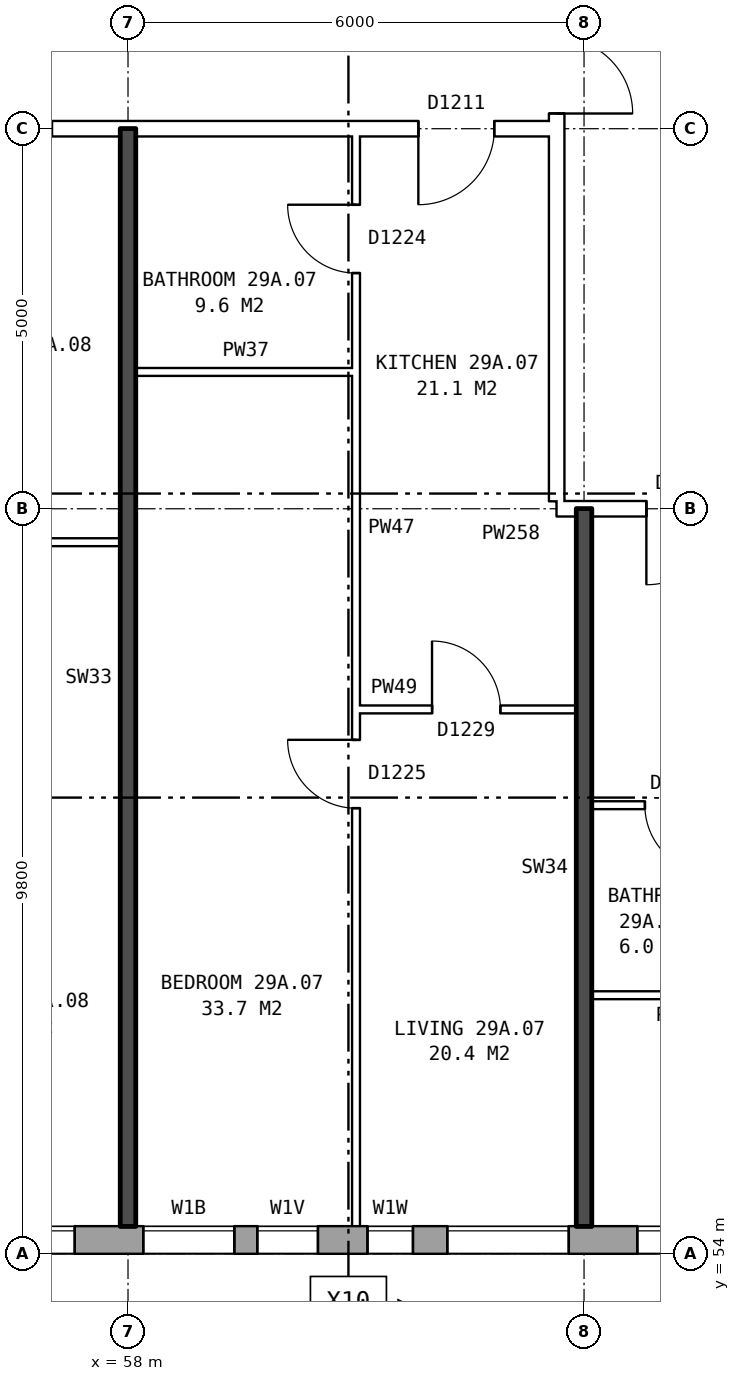
"""IFC4 building model, lengths in metres.
Left out: names, types, materials, properties, quantities, classifications, styles, units other than length and angle.
Written with IfcOpenShell. Run it as: python <this file> out.ifc"""

import sys

from ifc_helpers import new_model, si_unit, direction, frame, frame_2d, origin, place, context, subcontext, project, spatial, rectangle, extrude, element, fill, save


model = new_model("IFC4")
c1 = context("Model", 3, precision=1e-05, world=origin(), true_north=direction((0.0, 1.0)))
c2 = subcontext(c1, "Body", "Model", "MODEL_VIEW")
j1 = project(units=[si_unit("LENGTHUNIT", "METRE"), si_unit("PLANEANGLEUNIT", "RADIAN")], contexts=[c1])
p1 = place(None, origin())
s1 = spatial("IfcSite", under=j1, at=p1, CompositionType="ELEMENT")
p2 = place(p1, origin())
s2 = spatial("IfcBuilding", under=s1, at=p2, CompositionType="ELEMENT")
p3 = place(p2, frame((0.0, 0.0, 105.7)))
s3 = spatial("IfcBuildingStorey", under=s2, at=p3, CompositionType="ELEMENT", Elevation=105.7)
p4 = place(p3, frame((28.075, 54.18, 0.0), z_axis=(0.0, 0.0, 1.0), x_axis=(1.0, 0.0, 0.0)))
e1 = element("IfcWall", 1, at=p4, inside=s3, PredefinedType="STANDARD", context=c2, shape_type="SweptSolid", body=[
    extrude(rectangle(XDim=44.851, YDim=0.36, at=frame_2d((22.425, 0.0))), origin(), (0.0, 0.0, 1.0), 2.85),
])
p5 = place(p4, frame((0.625, 0.0, 0.8)))
e2 = element("IfcOpeningElement", 2, at=p5, cuts=e1, PredefinedType="OPENING", context=c2, shape_type="SweptSolid", body=[
    extrude(rectangle(XDim=1.6, YDim=1.8, at=frame_2d((0.8, 0.9))), frame((0.0, 0.19, 0.0), z_axis=(0.0, -1.0, 0.0), x_axis=(1.0, 0.0, 0.0)), (0.0, 0.0, 1.0), 0.38),
])
p6 = place(p4, frame((3.625, 0.0, 0.8)))
e3 = element("IfcOpeningElement", 3, at=p6, cuts=e1, PredefinedType="OPENING", context=c2, shape_type="SweptSolid", body=[
    extrude(rectangle(XDim=1.6, YDim=1.8, at=frame_2d((0.8, 0.9))), frame((0.0, 0.19, 0.0), z_axis=(0.0, -1.0, 0.0), x_axis=(1.0, 0.0, 0.0)), (0.0, 0.0, 1.0), 0.38),
])
p7 = place(p4, frame((6.625, 0.0, 0.8)))
e4 = element("IfcOpeningElement", 4, at=p7, cuts=e1, PredefinedType="OPENING", context=c2, shape_type="SweptSolid", body=[
    extrude(rectangle(XDim=1.6, YDim=1.8, at=frame_2d((0.8, 0.9))), frame((0.0, 0.19, 0.0), z_axis=(0.0, -1.0, 0.0), x_axis=(1.0, 0.0, 0.0)), (0.0, 0.0, 1.0), 0.38),
])
p8 = place(p4, frame((8.525, 0.0, 0.8)))
e5 = element("IfcOpeningElement", 5, at=p8, cuts=e1, PredefinedType="OPENING", context=c2, shape_type="SweptSolid", body=[
    extrude(rectangle(XDim=1.4, YDim=1.8, at=frame_2d((0.7, 0.9))), frame((0.0, 0.19, 0.0), z_axis=(0.0, -1.0, 0.0), x_axis=(1.0, 0.0, 0.0)), (0.0, 0.0, 1.0), 0.38),
])
p9 = place(p4, frame((13.175, 0.0, 0.8)))
e6 = element("IfcOpeningElement", 6, at=p9, cuts=e1, PredefinedType="OPENING", context=c2, shape_type="SweptSolid", body=[
    extrude(rectangle(XDim=1.0, YDim=0.9, at=frame_2d((0.5, 0.45))), frame((0.0, 0.19, 0.0), z_axis=(0.0, -1.0, 0.0), x_axis=(1.0, 0.0, 0.0)), (0.0, 0.0, 1.0), 0.38),
])
p10 = place(p4, frame((15.625, 0.0, 0.8)))
e7 = element("IfcOpeningElement", 7, at=p10, cuts=e1, PredefinedType="OPENING", context=c2, shape_type="SweptSolid", body=[
    extrude(rectangle(XDim=1.6, YDim=1.8, at=frame_2d((0.8, 0.9))), frame((0.0, 0.19, 0.0), z_axis=(0.0, -1.0, 0.0), x_axis=(1.0, 0.0, 0.0)), (0.0, 0.0, 1.0), 0.38),
])
p11 = place(p4, frame((18.625, 0.0, 0.8)))
e8 = element("IfcOpeningElement", 8, at=p11, cuts=e1, PredefinedType="OPENING", context=c2, shape_type="SweptSolid", body=[
    extrude(rectangle(XDim=1.6, YDim=1.8, at=frame_2d((0.8, 0.9))), frame((0.0, 0.19, 0.0), z_axis=(0.0, -1.0, 0.0), x_axis=(1.0, 0.0, 0.0)), (0.0, 0.0, 1.0), 0.38),
])
p12 = place(p4, frame((21.625, 0.0, 0.8)))
e9 = element("IfcOpeningElement", 9, at=p12, cuts=e1, PredefinedType="OPENING", context=c2, shape_type="SweptSolid", body=[
    extrude(rectangle(XDim=1.6, YDim=1.8, at=frame_2d((0.8, 0.9))), frame((0.0, 0.19, 0.0), z_axis=(0.0, -1.0, 0.0), x_axis=(1.0, 0.0, 0.0)), (0.0, 0.0, 1.0), 0.38),
])
p13 = place(p4, frame((24.625, 0.0, 0.8)))
e10 = element("IfcOpeningElement", 10, at=p13, cuts=e1, PredefinedType="OPENING", context=c2, shape_type="SweptSolid", body=[
    extrude(rectangle(XDim=1.6, YDim=1.8, at=frame_2d((0.8, 0.9))), frame((0.0, 0.19, 0.0), z_axis=(0.0, -1.0, 0.0), x_axis=(1.0, 0.0, 0.0)), (0.0, 0.0, 1.0), 0.38),
])
p14 = place(p4, frame((27.625, 0.0, 0.8)))
e11 = element("IfcOpeningElement", 11, at=p14, cuts=e1, PredefinedType="OPENING", context=c2, shape_type="SweptSolid", body=[
    extrude(rectangle(XDim=1.6, YDim=1.8, at=frame_2d((0.8, 0.9))), frame((0.0, 0.19, 0.0), z_axis=(0.0, -1.0, 0.0), x_axis=(1.0, 0.0, 0.0)), (0.0, 0.0, 1.0), 0.38),
])
p15 = place(p4, frame((30.125, 0.0, 0.15)))
e12 = element("IfcOpeningElement", 12, at=p15, cuts=e1, PredefinedType="OPENING", context=c2, shape_type="SweptSolid", body=[
    extrude(rectangle(XDim=1.2, YDim=1.8, at=frame_2d((0.6, 0.9))), frame((0.0, 0.19, 0.0), z_axis=(0.0, -1.0, 0.0), x_axis=(1.0, 0.0, 0.0)), (0.0, 0.0, 1.0), 0.38),
])
p16 = place(p4, frame((33.075, 0.0, 1.6)))
e13 = element("IfcOpeningElement", 13, at=p16, cuts=e1, PredefinedType="OPENING", context=c2, shape_type="SweptSolid", body=[
    extrude(rectangle(XDim=0.6, YDim=0.9, at=frame_2d((0.3, 0.45))), frame((0.0, 0.19, 0.0), z_axis=(0.0, -1.0, 0.0), x_axis=(1.0, 0.0, 0.0)), (0.0, 0.0, 1.0), 0.38),
])
p17 = place(p4, frame((36.625, 0.0, 0.8)))
e14 = element("IfcOpeningElement", 14, at=p17, cuts=e1, PredefinedType="OPENING", context=c2, shape_type="SweptSolid", body=[
    extrude(rectangle(XDim=1.6, YDim=1.8, at=frame_2d((0.8, 0.9))), frame((0.0, 0.19, 0.0), z_axis=(0.0, -1.0, 0.0), x_axis=(1.0, 0.0, 0.0)), (0.0, 0.0, 1.0), 0.38),
])
p18 = place(p4, frame((39.625, 0.0, 0.8)))
e15 = element("IfcOpeningElement", 15, at=p18, cuts=e1, PredefinedType="OPENING", context=c2, shape_type="SweptSolid", body=[
    extrude(rectangle(XDim=1.6, YDim=1.8, at=frame_2d((0.8, 0.9))), frame((0.0, 0.19, 0.0), z_axis=(0.0, -1.0, 0.0), x_axis=(1.0, 0.0, 0.0)), (0.0, 0.0, 1.0), 0.38),
])
p19 = place(p4, frame((42.625, 0.0, 0.8)))
e16 = element("IfcOpeningElement", 16, at=p19, cuts=e1, PredefinedType="OPENING", context=c2, shape_type="SweptSolid", body=[
    extrude(rectangle(XDim=1.6, YDim=1.8, at=frame_2d((0.8, 0.9))), frame((0.0, 0.19, 0.0), z_axis=(0.0, -1.0, 0.0), x_axis=(1.0, 0.0, 0.0)), (0.0, 0.0, 1.0), 0.38),
])
p20 = place(p4, frame((10.225, 0.0, 1.1)))
e17 = element("IfcOpeningElement", 17, at=p20, cuts=e1, PredefinedType="OPENING", context=c2, shape_type="SweptSolid", body=[
    extrude(rectangle(XDim=0.8, YDim=1.5, at=frame_2d((0.4, 0.75))), frame((0.0, 0.19, 0.0), z_axis=(0.0, -1.0, 0.0), x_axis=(1.0, 0.0, 0.0)), (0.0, 0.0, 1.0), 0.38),
])
p21 = place(p4, frame((14.475, 0.0, 0.8)))
e18 = element("IfcOpeningElement", 18, at=p21, cuts=e1, PredefinedType="OPENING", context=c2, shape_type="SweptSolid", body=[
    extrude(rectangle(XDim=0.8, YDim=1.8, at=frame_2d((0.4, 0.9))), frame((0.0, 0.19, 0.0), z_axis=(0.0, -1.0, 0.0), x_axis=(1.0, 0.0, 0.0)), (0.0, 0.0, 1.0), 0.38),
])
p22 = place(p4, frame((31.625, 0.0, 0.25)))
e19 = element("IfcOpeningElement", 19, at=p22, cuts=e1, PredefinedType="OPENING", context=c2, shape_type="SweptSolid", body=[
    extrude(rectangle(XDim=0.8, YDim=0.9, at=frame_2d((0.4, 0.45))), frame((0.0, 0.19, 0.0), z_axis=(0.0, -1.0, 0.0), x_axis=(1.0, 0.0, 0.0)), (0.0, 0.0, 1.0), 0.38),
])
p23 = place(p4, frame((34.125, 0.0, 0.8)))
e20 = element("IfcOpeningElement", 20, at=p23, cuts=e1, PredefinedType="OPENING", context=c2, shape_type="SweptSolid", body=[
    extrude(rectangle(XDim=1.6, YDim=1.8, at=frame_2d((0.8, 0.9))), frame((0.0, 0.19, 0.0), z_axis=(0.0, -1.0, 0.0), x_axis=(1.0, 0.0, 0.0)), (0.0, 0.0, 1.0), 0.38),
])
p24 = place(p3, frame((63.64, 63.9, 0.0), z_axis=(0.0, 0.0, 1.0), x_axis=(0.0, 1.0, 0.0)))
e21 = element("IfcWall", 21, at=p24, inside=s3, PredefinedType="PARTITIONING", context=c2, shape_type="SweptSolid", body=[
    extrude(rectangle(XDim=12.2, YDim=0.2, at=frame_2d((6.1, 0.0))), origin(), (0.0, 0.0, 1.0), 2.85),
])
p25 = place(p24, frame((5.1, 0.0, 0.0)))
e22 = element("IfcOpeningElement", 22, at=p25, cuts=e21, PredefinedType="OPENING", context=c2, shape_type="SweptSolid", body=[
    extrude(rectangle(XDim=2.0, YDim=2.1, at=frame_2d((1.0, 1.05))), frame((0.0, 0.11, 0.0), z_axis=(0.0, -1.0, 0.0), x_axis=(1.0, 0.0, 0.0)), (0.0, 0.0, 1.0), 0.22),
])
p26 = place(p3, frame((64.1, 57.4, 0.0), z_axis=(0.0, 0.0, 1.0), x_axis=(1.0, 0.0, 0.0)))
e23 = element("IfcWall", 23, at=p26, inside=s3, PredefinedType="PARTITIONING", context=c2, shape_type="SweptSolid", body=[
    extrude(rectangle(XDim=2.3, YDim=0.1, at=frame_2d((1.15, 0.0))), origin(), (0.0, 0.0, 1.0), 2.85),
])
p27 = place(p3, frame((64.1, 59.9, 0.0), z_axis=(0.0, 0.0, 1.0), x_axis=(1.0, 0.0, 0.0)))
e24 = element("IfcWall", 24, at=p27, inside=s3, PredefinedType="PARTITIONING", context=c2, shape_type="SweptSolid", body=[
    extrude(rectangle(XDim=5.8, YDim=0.1, at=frame_2d((2.9, 0.0))), origin(), (0.0, 0.0, 1.0), 2.85),
])
p28 = place(p27, frame((3.6, 0.0, 0.0)))
e25 = element("IfcOpeningElement", 25, at=p28, cuts=e24, PredefinedType="OPENING", context=c2, shape_type="SweptSolid", body=[
    extrude(rectangle(XDim=0.9, YDim=2.1, at=frame_2d((0.45, 1.05))), frame((0.0, 0.06, 0.0), z_axis=(0.0, -1.0, 0.0), x_axis=(1.0, 0.0, 0.0)), (0.0, 0.0, 1.0), 0.12),
])
p29 = place(p27, frame((0.7, 0.0, 0.0)))
e26 = element("IfcOpeningElement", 26, at=p29, cuts=e24, PredefinedType="OPENING", context=c2, shape_type="SweptSolid", body=[
    extrude(rectangle(XDim=0.9, YDim=2.1, at=frame_2d((0.45, 1.05))), frame((0.0, 0.06, 0.0), z_axis=(0.0, -1.0, 0.0), x_axis=(1.0, 0.0, 0.0)), (0.0, 0.0, 1.0), 0.12),
])
p30 = place(p3, frame((61.0, 61.16, 0.0), z_axis=(0.0, 0.0, 1.0), x_axis=(1.0, 0.0, 0.0)))
e27 = element("IfcWall", 27, at=p30, inside=s3, PredefinedType="PARTITIONING", context=c2, shape_type="SweptSolid", body=[
    extrude(rectangle(XDim=2.9, YDim=0.1, at=frame_2d((1.45, 0.0))), origin(), (0.0, 0.0, 1.0), 2.85),
])
p31 = place(p30, frame((1.0, 0.0, 0.0)))
e28 = element("IfcOpeningElement", 28, at=p31, cuts=e27, PredefinedType="OPENING", context=c2, shape_type="SweptSolid", body=[
    extrude(rectangle(XDim=0.9, YDim=2.1, at=frame_2d((0.45, 1.05))), frame((0.0, 0.06, 0.0), z_axis=(0.0, -1.0, 0.0), x_axis=(1.0, 0.0, 0.0)), (0.0, 0.0, 1.0), 0.12),
])
p32 = place(p3, frame((55.0, 63.36, 0.0), z_axis=(0.0, 0.0, 1.0), x_axis=(1.0, 0.0, 0.0)))
e29 = element("IfcWall", 29, at=p32, inside=s3, PredefinedType="PARTITIONING", context=c2, shape_type="SweptSolid", body=[
    extrude(rectangle(XDim=2.9, YDim=0.1, at=frame_2d((1.45, 0.0))), origin(), (0.0, 0.0, 1.0), 2.85),
])
p33 = place(p32, frame((1.0, 0.0, 0.0)))
e30 = element("IfcOpeningElement", 30, at=p33, cuts=e29, PredefinedType="OPENING", context=c2, shape_type="SweptSolid", body=[
    extrude(rectangle(XDim=0.9, YDim=2.1, at=frame_2d((0.45, 1.05))), frame((0.0, 0.06, 0.0), z_axis=(0.0, -1.0, 0.0), x_axis=(1.0, 0.0, 0.0)), (0.0, 0.0, 1.0), 0.12),
])
p34 = place(p3, frame((63.64, 63.8, 0.0), z_axis=(0.0, 0.0, 1.0), x_axis=(1.0, 0.0, 0.0)))
e31 = element("IfcWall", 31, at=p34, inside=s3, PredefinedType="PARTITIONING", context=c2, shape_type="SweptSolid", body=[
    extrude(rectangle(XDim=3.0, YDim=0.2, at=frame_2d((1.5, 0.0))), origin(), (0.0, 0.0, 1.0), 2.85),
])
p35 = place(p34, frame((1.18, 0.0, 0.0)))
e32 = element("IfcOpeningElement", 32, at=p35, cuts=e31, PredefinedType="OPENING", context=c2, shape_type="SweptSolid", body=[
    extrude(rectangle(XDim=1.0, YDim=2.1, at=frame_2d((0.5, 1.05))), frame((0.0, 0.11, 0.0), z_axis=(0.0, -1.0, 0.0), x_axis=(1.0, 0.0, 0.0)), (0.0, 0.0, 1.0), 0.22),
])
p36 = place(p3, frame((58.1, 65.6, 0.0), z_axis=(0.0, 0.0, 1.0), x_axis=(1.0, 0.0, 0.0)))
e33 = element("IfcWall", 33, at=p36, inside=s3, PredefinedType="PARTITIONING", context=c2, shape_type="SweptSolid", body=[
    extrude(rectangle(XDim=2.9, YDim=0.1, at=frame_2d((1.45, 0.0))), origin(), (0.0, 0.0, 1.0), 2.85),
])
p37 = place(p3, frame((44.36, 68.8, 0.0), z_axis=(0.0, 0.0, 1.0), x_axis=(1.0, 0.0, 0.0)))
e34 = element("IfcWall", 34, at=p37, inside=s3, PredefinedType="PARTITIONING", context=c2, shape_type="SweptSolid", body=[
    extrude(rectangle(XDim=19.28, YDim=0.2, at=frame_2d((9.64, 0.0))), origin(), (0.0, 0.0, 1.0), 2.85),
])
p38 = place(p37, frame((17.46, 0.0, 0.0)))
e35 = element("IfcOpeningElement", 35, at=p38, cuts=e34, PredefinedType="OPENING", context=c2, shape_type="SweptSolid", body=[
    extrude(rectangle(XDim=1.0, YDim=2.1, at=frame_2d((0.5, 1.05))), frame((0.0, 0.11, 0.0), z_axis=(0.0, -1.0, 0.0), x_axis=(1.0, 0.0, 0.0)), (0.0, 0.0, 1.0), 0.22),
])
p39 = place(p37, frame((11.64, 0.0, 0.0)))
e36 = element("IfcOpeningElement", 36, at=p39, cuts=e34, PredefinedType="OPENING", context=c2, shape_type="SweptSolid", body=[
    extrude(rectangle(XDim=1.0, YDim=2.1, at=frame_2d((0.5, 1.05))), frame((0.0, 0.11, 0.0), z_axis=(0.0, -1.0, 0.0), x_axis=(1.0, 0.0, 0.0)), (0.0, 0.0, 1.0), 0.22),
])
p40 = place(p37, frame((2.64, 0.0, 0.0)))
e37 = element("IfcOpeningElement", 37, at=p40, cuts=e34, PredefinedType="OPENING", context=c2, shape_type="SweptSolid", body=[
    extrude(rectangle(XDim=1.0, YDim=2.1, at=frame_2d((0.5, 1.05))), frame((0.0, 0.11, 0.0), z_axis=(0.0, -1.0, 0.0), x_axis=(1.0, 0.0, 0.0)), (0.0, 0.0, 1.0), 0.22),
])
p41 = place(p3, frame((58.0, 54.36, 0.0), z_axis=(0.0, 0.0, 1.0), x_axis=(0.0, 1.0, 0.0)))
e38 = element("IfcWall", 38, at=p41, inside=s3, PredefinedType="SOLIDWALL", context=c2, shape_type="SweptSolid", body=[
    extrude(rectangle(XDim=14.44, YDim=0.2, at=frame_2d((7.22, 0.0))), origin(), (0.0, 0.0, 1.0), 2.85),
])
p42 = place(p3, frame((61.0, 54.36, 0.0), z_axis=(0.0, 0.0, 1.0), x_axis=(0.0, 1.0, 0.0)))
e39 = element("IfcWall", 39, at=p42, inside=s3, PredefinedType="PARTITIONING", context=c2, shape_type="SweptSolid", body=[
    extrude(rectangle(XDim=14.34, YDim=0.1, at=frame_2d((7.17, 0.0))), origin(), (0.0, 0.0, 1.0), 2.85),
])
p43 = place(p42, frame((5.5, 0.0, 0.0)))
e40 = element("IfcOpeningElement", 40, at=p43, cuts=e39, PredefinedType="OPENING", context=c2, shape_type="SweptSolid", body=[
    extrude(rectangle(XDim=0.9, YDim=2.1, at=frame_2d((0.45, 1.05))), frame((0.0, 0.06, 0.0), z_axis=(0.0, -1.0, 0.0), x_axis=(1.0, 0.0, 0.0)), (0.0, 0.0, 1.0), 0.12),
])
p44 = place(p42, frame((12.54, 0.0, 0.0)))
e41 = element("IfcOpeningElement", 41, at=p44, cuts=e39, PredefinedType="OPENING", context=c2, shape_type="SweptSolid", body=[
    extrude(rectangle(XDim=0.9, YDim=2.1, at=frame_2d((0.45, 1.05))), frame((0.0, 0.06, 0.0), z_axis=(0.0, -1.0, 0.0), x_axis=(1.0, 0.0, 0.0)), (0.0, 0.0, 1.0), 0.12),
])
p45 = place(p3, frame((64.0, 54.36, 0.0), z_axis=(0.0, 0.0, 1.0), x_axis=(0.0, 1.0, 0.0)))
e42 = element("IfcWall", 42, at=p45, inside=s3, PredefinedType="SOLIDWALL", context=c2, shape_type="SweptSolid", body=[
    extrude(rectangle(XDim=9.44, YDim=0.2, at=frame_2d((4.72, 0.0))), origin(), (0.0, 0.0, 1.0), 2.85),
])
p46 = place(p14, origin())
e43 = element("IfcWindow", 43, at=p46, inside=s3, PartitioningType="SINGLE_PANEL", PredefinedType="WINDOW", context=c2, shape_type="SweptSolid", body=[
    extrude(rectangle(XDim=1.6, YDim=1.8, at=frame_2d((0.8, 0.9))), frame((0.0, 0.15, 0.0), z_axis=(0.0, -1.0, 0.0), x_axis=(1.0, 0.0, 0.0)), (0.0, 0.0, 1.0), 0.06),
])
fill(e11, e43)
p47 = place(p15, origin())
e44 = element("IfcWindow", 44, at=p47, inside=s3, PartitioningType="SINGLE_PANEL", PredefinedType="WINDOW", context=c2, shape_type="SweptSolid", body=[
    extrude(rectangle(XDim=1.2, YDim=1.8, at=frame_2d((0.6, 0.9))), frame((0.0, 0.15, 0.0), z_axis=(0.0, -1.0, 0.0), x_axis=(1.0, 0.0, 0.0)), (0.0, 0.0, 1.0), 0.06),
])
fill(e12, e44)
p48 = place(p16, origin())
e45 = element("IfcWindow", 45, at=p48, inside=s3, PartitioningType="SINGLE_PANEL", PredefinedType="WINDOW", context=c2, shape_type="SweptSolid", body=[
    extrude(rectangle(XDim=0.6, YDim=0.9, at=frame_2d((0.3, 0.45))), frame((0.0, 0.15, 0.0), z_axis=(0.0, -1.0, 0.0), x_axis=(1.0, 0.0, 0.0)), (0.0, 0.0, 1.0), 0.06),
])
fill(e13, e45)
p49 = place(p17, origin())
e46 = element("IfcWindow", 46, at=p49, inside=s3, PartitioningType="SINGLE_PANEL", PredefinedType="WINDOW", context=c2, shape_type="SweptSolid", body=[
    extrude(rectangle(XDim=1.6, YDim=1.8, at=frame_2d((0.8, 0.9))), frame((0.0, 0.15, 0.0), z_axis=(0.0, -1.0, 0.0), x_axis=(1.0, 0.0, 0.0)), (0.0, 0.0, 1.0), 0.06),
])
fill(e14, e46)
p50 = place(p25, frame((2.0, 0.0, 0.0), z_axis=(0.0, 0.0, 1.0), x_axis=(-1.0, 0.0, 0.0)))
e47 = element("IfcDoor", 47, at=p50, inside=s3, OperationType="DOUBLE_DOOR_SINGLE_SWING", PredefinedType="DOOR", context=c2, shape_type="SweptSolid", body=[
    extrude(rectangle(XDim=2.0, YDim=2.1, at=frame_2d((1.0, 1.05))), frame((0.0, 0.025, 0.0), z_axis=(0.0, -1.0, 0.0), x_axis=(1.0, 0.0, 0.0)), (0.0, 0.0, 1.0), 0.05),
])
fill(e22, e47)
p51 = place(p35, frame((1.0, 0.0, 0.0), z_axis=(0.0, 0.0, 1.0), x_axis=(-1.0, 0.0, 0.0)))
e48 = element("IfcDoor", 48, at=p51, inside=s3, OperationType="SINGLE_SWING_RIGHT", PredefinedType="DOOR", context=c2, shape_type="SweptSolid", body=[
    extrude(rectangle(XDim=1.0, YDim=2.1, at=frame_2d((0.5, 1.05))), frame((0.0, 0.025, 0.0), z_axis=(0.0, -1.0, 0.0), x_axis=(1.0, 0.0, 0.0)), (0.0, 0.0, 1.0), 0.05),
])
fill(e32, e48)
p52 = place(p29, frame((0.9, 0.0, 0.0), z_axis=(0.0, 0.0, 1.0), x_axis=(-1.0, 0.0, 0.0)))
e49 = element("IfcDoor", 49, at=p52, inside=s3, OperationType="SINGLE_SWING_LEFT", PredefinedType="DOOR", context=c2, shape_type="SweptSolid", body=[
    extrude(rectangle(XDim=0.9, YDim=2.1, at=frame_2d((0.45, 1.05))), frame((0.0, 0.025, 0.0), z_axis=(0.0, -1.0, 0.0), x_axis=(1.0, 0.0, 0.0)), (0.0, 0.0, 1.0), 0.05),
])
fill(e26, e49)
p53 = place(p43, origin())
e50 = element("IfcDoor", 50, at=p53, inside=s3, OperationType="SINGLE_SWING_RIGHT", PredefinedType="DOOR", context=c2, shape_type="SweptSolid", body=[
    extrude(rectangle(XDim=0.9, YDim=2.1, at=frame_2d((0.45, 1.05))), frame((0.0, 0.025, 0.0), z_axis=(0.0, -1.0, 0.0), x_axis=(1.0, 0.0, 0.0)), (0.0, 0.0, 1.0), 0.05),
])
fill(e40, e50)
p54 = place(p38, frame((1.0, 0.0, 0.0), z_axis=(0.0, 0.0, 1.0), x_axis=(-1.0, 0.0, 0.0)))
e51 = element("IfcDoor", 51, at=p54, inside=s3, OperationType="SINGLE_SWING_RIGHT", PredefinedType="DOOR", context=c2, shape_type="SweptSolid", body=[
    extrude(rectangle(XDim=1.0, YDim=2.1, at=frame_2d((0.5, 1.05))), frame((0.0, 0.025, 0.0), z_axis=(0.0, -1.0, 0.0), x_axis=(1.0, 0.0, 0.0)), (0.0, 0.0, 1.0), 0.05),
])
fill(e35, e51)
p55 = place(p31, origin())
e52 = element("IfcDoor", 52, at=p55, inside=s3, OperationType="SINGLE_SWING_LEFT", PredefinedType="DOOR", context=c2, shape_type="SweptSolid", body=[
    extrude(rectangle(XDim=0.9, YDim=2.1, at=frame_2d((0.45, 1.05))), frame((0.0, 0.025, 0.0), z_axis=(0.0, -1.0, 0.0), x_axis=(1.0, 0.0, 0.0)), (0.0, 0.0, 1.0), 0.05),
])
fill(e28, e52)
p56 = place(p44, origin())
e53 = element("IfcDoor", 53, at=p56, inside=s3, OperationType="SINGLE_SWING_RIGHT", PredefinedType="DOOR", context=c2, shape_type="SweptSolid", body=[
    extrude(rectangle(XDim=0.9, YDim=2.1, at=frame_2d((0.45, 1.05))), frame((0.0, 0.025, 0.0), z_axis=(0.0, -1.0, 0.0), x_axis=(1.0, 0.0, 0.0)), (0.0, 0.0, 1.0), 0.05),
])
fill(e41, e53)
p57 = place(p22, origin())
e54 = element("IfcWindow", 54, at=p57, inside=s3, PartitioningType="SINGLE_PANEL", PredefinedType="WINDOW", context=c2, shape_type="SweptSolid", body=[
    extrude(rectangle(XDim=0.8, YDim=0.9, at=frame_2d((0.4, 0.45))), frame((0.0, 0.15, 0.0), z_axis=(0.0, -1.0, 0.0), x_axis=(1.0, 0.0, 0.0)), (0.0, 0.0, 1.0), 0.06),
])
fill(e19, e54)
p58 = place(p23, origin())
e55 = element("IfcWindow", 55, at=p58, inside=s3, PartitioningType="SINGLE_PANEL", PredefinedType="WINDOW", context=c2, shape_type="SweptSolid", body=[
    extrude(rectangle(XDim=1.6, YDim=1.8, at=frame_2d((0.8, 0.9))), frame((0.0, 0.15, 0.0), z_axis=(0.0, -1.0, 0.0), x_axis=(1.0, 0.0, 0.0)), (0.0, 0.0, 1.0), 0.06),
])
fill(e20, e55)
save(model, sys.argv[1])
